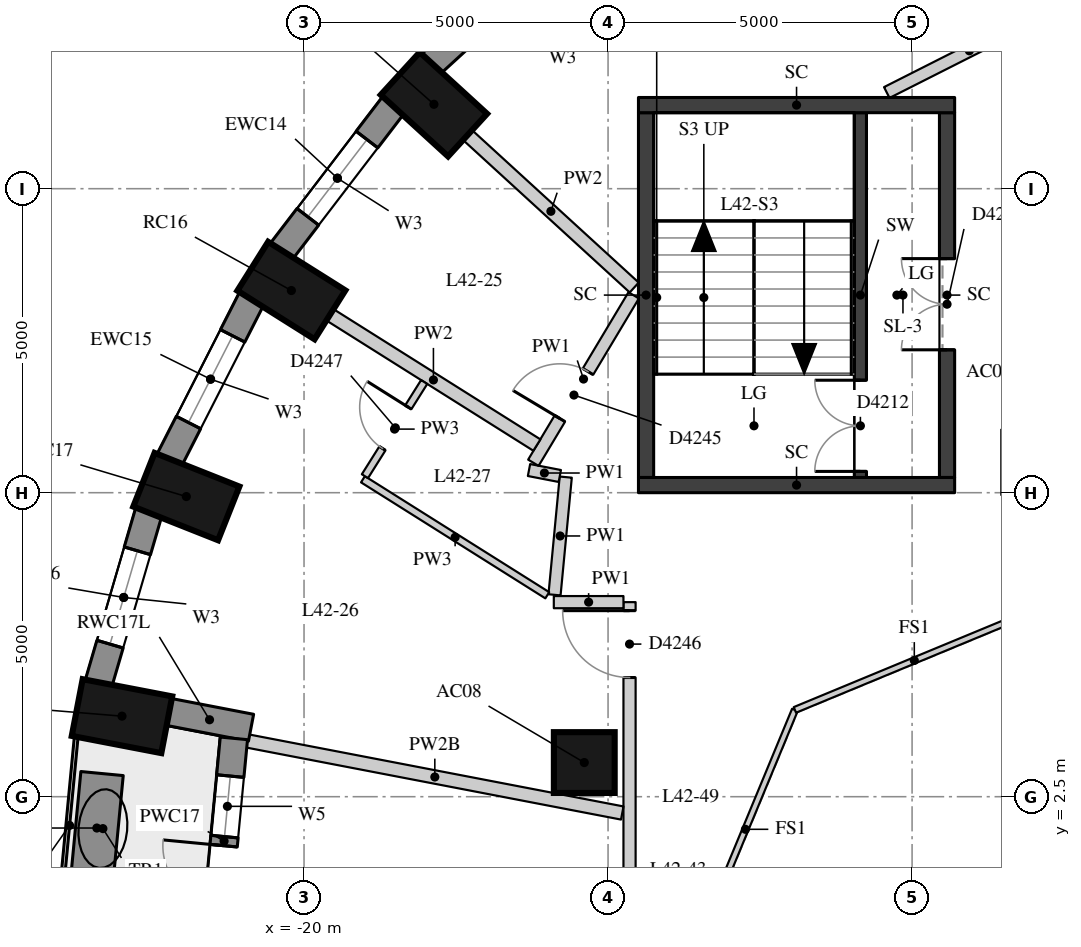
"""IFC4 building model, lengths in metres.
Left out: names, types, materials, properties, quantities, classifications, styles, units other than length and angle.
Written with IfcOpenShell. Run it as: python <this file> out.ifc"""

import sys

from ifc_helpers import new_model, si_unit, direction, frame, frame_2d, origin, origin_2d, place, context, subcontext, project, spatial, rectangle, extrude, element, fill, save


model = new_model("IFC4")
c1 = context("Model", 3, precision=1e-05, world=origin(), true_north=direction((0.0, 1.0)))
c2 = subcontext(c1, "Body", "Model", "MODEL_VIEW")
j1 = project(units=[si_unit("LENGTHUNIT", "METRE"), si_unit("PLANEANGLEUNIT", "RADIAN")], contexts=[c1])
p1 = place(None, origin())
s1 = spatial("IfcSite", under=j1, at=p1, CompositionType="ELEMENT")
p2 = place(p1, origin())
s2 = spatial("IfcBuilding", under=s1, at=p2, CompositionType="ELEMENT")
p3 = place(p2, frame((0.0, 0.0, 151.7)))
s3 = spatial("IfcBuildingStorey", under=s2, at=p3, CompositionType="ELEMENT", Elevation=151.7)
for number, where, z_axis, x_axis in (
    (1, (-17.864, 13.888, 0.0), (0.0, 0.0, 1.0), (-0.738, 0.675, 0.0)),
    (2, (-20.208, 10.825, 0.0), (0.0, 0.0, 1.0), (-0.846, 0.533, 0.0)),
    (3, (-21.936, 7.436, 0.0), (0.0, 0.0, 1.0), (-0.93, 0.369, 0.0)),
    (4, (-22.994, 3.825, 0.0), (0.0, 0.0, 1.0), (-0.982, 0.189, 0.0)),
):
    element("IfcColumn", number, at=place(p3, frame(where, z_axis=z_axis, x_axis=x_axis)), inside=s3, PredefinedType="COLUMN", context=c2, shape_type="SweptSolid", body=[
        extrude(rectangle(XDim=1.5, YDim=0.95, at=origin_2d()), origin(), (0.0, 0.0, 1.0), 3.3),
    ])
p4 = place(p3, frame((-15.391, 3.062, 0.0), z_axis=(0.0, 0.0, 1.0), x_axis=(1.0, 0.0, 0.0)))
e5 = element("IfcColumn", 5, at=p4, inside=s3, PredefinedType="COLUMN", context=c2, shape_type="SweptSolid", body=[
    extrude(rectangle(XDim=1.0, YDim=1.0, at=origin_2d()), origin(), (0.0, 0.0, 1.0), 3.3),
])
p5 = place(p3, frame((-15.63, 16.639, 0.0), z_axis=(0.0, 0.0, 1.0), x_axis=(-0.737808755941, -0.675009807082, 0.0)))
e6 = element("IfcWall", 6, at=p5, inside=s3, PredefinedType="SOLIDWALL", context=c2, shape_type="SweptSolid", body=[
    extrude(rectangle(XDim=3.094, YDim=0.45, at=frame_2d((1.547, 0.0))), origin(), (0.0, 0.0, 1.0), 3.02),
])
p6 = place(p5, frame((0.747, 0.0, 0.4)))
e7 = element("IfcOpeningElement", 7, at=p6, cuts=e6, PredefinedType="OPENING", context=c2, shape_type="SweptSolid", body=[
    extrude(rectangle(XDim=1.6, YDim=1.75, at=frame_2d((0.8, 0.875))), frame((0.0, 0.235, 0.0), z_axis=(0.0, -1.0, 0.0), x_axis=(1.0, 0.0, 0.0)), (0.0, 0.0, 1.0), 0.47),
])
p7 = place(p3, frame((-18.528, 13.879, 0.0), z_axis=(0.0, 0.0, 1.0), x_axis=(-0.607817056371, -0.794077090706, 0.0)))
e8 = element("IfcWall", 8, at=p7, inside=s3, PredefinedType="SOLIDWALL", context=c2, shape_type="SweptSolid", body=[
    extrude(rectangle(XDim=3.037, YDim=0.45, at=frame_2d((1.519, 0.0))), origin(), (0.0, 0.0, 1.0), 3.02),
])
p8 = place(p7, frame((0.719, 0.0, 0.4)))
e9 = element("IfcOpeningElement", 9, at=p8, cuts=e8, PredefinedType="OPENING", context=c2, shape_type="SweptSolid", body=[
    extrude(rectangle(XDim=1.6, YDim=1.75, at=frame_2d((0.8, 0.875))), frame((0.0, 0.235, 0.0), z_axis=(0.0, -1.0, 0.0), x_axis=(1.0, 0.0, 0.0)), (0.0, 0.0, 1.0), 0.47),
])
p9 = place(p3, frame((-20.859, 10.697, 0.0), z_axis=(0.0, 0.0, 1.0), x_axis=(-0.454133999889, -0.890933392653, 0.0)))
e10 = element("IfcWall", 10, at=p9, inside=s3, PredefinedType="SOLIDWALL", context=c2, shape_type="SweptSolid", body=[
    extrude(rectangle(XDim=2.986, YDim=0.45, at=frame_2d((1.493, 0.0))), origin(), (0.0, 0.0, 1.0), 3.02),
])
p10 = place(p9, frame((0.693, 0.0, 0.4)))
e11 = element("IfcOpeningElement", 11, at=p10, cuts=e10, PredefinedType="OPENING", context=c2, shape_type="SweptSolid", body=[
    extrude(rectangle(XDim=1.6, YDim=1.75, at=frame_2d((0.8, 0.875))), frame((0.0, 0.235, 0.0), z_axis=(0.0, -1.0, 0.0), x_axis=(1.0, 0.0, 0.0)), (0.0, 0.0, 1.0), 0.47),
])
p11 = place(p3, frame((-22.551, 7.191, 0.0), z_axis=(0.0, 0.0, 1.0), x_axis=(-0.281125768296, -0.959670934435, 0.0)))
e12 = element("IfcWall", 12, at=p11, inside=s3, PredefinedType="SOLIDWALL", context=c2, shape_type="SweptSolid", body=[
    extrude(rectangle(XDim=2.948, YDim=0.45, at=frame_2d((1.474, 0.0))), origin(), (0.0, 0.0, 1.0), 3.02),
])
p12 = place(p11, frame((0.674, 0.0, 0.4)))
e13 = element("IfcOpeningElement", 13, at=p12, cuts=e12, PredefinedType="OPENING", context=c2, shape_type="SweptSolid", body=[
    extrude(rectangle(XDim=1.6, YDim=1.75, at=frame_2d((0.8, 0.875))), frame((0.0, 0.235, 0.0), z_axis=(0.0, -1.0, 0.0), x_axis=(1.0, 0.0, 0.0)), (0.0, 0.0, 1.0), 0.47),
])
p13 = place(p3, frame((-22.237, 3.896, 0.0), z_axis=(0.0, 0.0, 1.0), x_axis=(0.98204526411, -0.188645432598, 0.0)))
e14 = element("IfcWall", 14, at=p13, inside=s3, PredefinedType="SOLIDWALL", context=c2, shape_type="SweptSolid", body=[
    extrude(rectangle(XDim=1.39, YDim=0.45, at=frame_2d((0.695, 0.0))), origin(), (0.0, 0.0, 1.0), 2.57),
])
p14 = place(p3, frame((-21.154, 3.459, 0.0), z_axis=(0.0, 0.0, 1.0), x_axis=(-0.094968544931, -0.995480273774, 0.0)))
e15 = element("IfcWall", 15, at=p14, inside=s3, PredefinedType="SOLIDWALL", context=c2, shape_type="SweptSolid", body=[
    extrude(rectangle(XDim=3.396, YDim=0.45, at=frame_2d((1.698, 0.0))), origin(), (0.0, 0.0, 1.0), 3.02),
])
p15 = place(p14, frame((0.623, 0.0, 0.4)))
e16 = element("IfcOpeningElement", 16, at=p15, cuts=e15, PredefinedType="OPENING", context=c2, shape_type="SweptSolid", body=[
    extrude(rectangle(XDim=1.0, YDim=1.75, at=frame_2d((0.5, 0.875))), frame((0.0, 0.235, 0.0), z_axis=(0.0, -1.0, 0.0), x_axis=(1.0, 0.0, 0.0)), (0.0, 0.0, 1.0), 0.47),
])
p16 = place(p14, frame((1.773, 0.0, 0.0)))
e17 = element("IfcOpeningElement", 17, at=p16, cuts=e15, PredefinedType="OPENING", context=c2, shape_type="SweptSolid", body=[
    extrude(rectangle(XDim=1.0, YDim=2.15, at=frame_2d((0.5, 1.075))), frame((0.0, 0.235, 0.0), z_axis=(0.0, -1.0, 0.0), x_axis=(1.0, 0.0, 0.0)), (0.0, 0.0, 1.0), 0.47),
])
p17 = place(p3, frame((-23.322, 2.881, 0.0), z_axis=(0.0, 0.0, 1.0), x_axis=(-0.095205890594, -0.995457602511, 0.0)))
e18 = element("IfcWall", 18, at=p17, inside=s3, PredefinedType="USERDEFINED", context=c2, shape_type="SweptSolid", body=[
    extrude(rectangle(XDim=1.8, YDim=0.7, at=frame_2d((0.9, 0.0))), origin(), (0.0, 0.0, 1.0), 0.75),
])
p18 = place(p3, frame((-10.85, 7.75, 0.0), z_axis=(0.0, 0.0, 1.0), x_axis=(0.0, 1.0, 0.0)))
e19 = element("IfcWall", 19, at=p18, inside=s3, PredefinedType="SHEAR", context=c2, shape_type="SweptSolid", body=[
    extrude(rectangle(XDim=6.0, YDim=0.2, at=frame_2d((3.0, 0.0))), origin(), (0.0, 0.0, 1.0), 3.02),
])
p19 = place(p18, frame((0.1, 0.0, 0.0)))
e20 = element("IfcOpeningElement", 20, at=p19, cuts=e19, PredefinedType="OPENING", context=c2, shape_type="SweptSolid", body=[
    extrude(rectangle(XDim=1.5, YDim=2.1, at=frame_2d((0.75, 1.05))), frame((0.0, 0.11, 0.0), z_axis=(0.0, -1.0, 0.0), x_axis=(1.0, 0.0, 0.0)), (0.0, 0.0, 1.0), 0.22),
])
p20 = place(p3, frame((-14.375, 7.75, -0.28), z_axis=(0.0, 0.0, 1.0), x_axis=(0.0, 1.0, 0.0)))
e21 = element("IfcWall", 21, at=p20, inside=s3, PredefinedType="SHEAR", context=c2, shape_type="SweptSolid", body=[
    extrude(rectangle(XDim=6.0, YDim=0.25, at=frame_2d((3.0, 0.0))), origin(), (0.0, 0.0, 1.0), 3.3),
])
p21 = place(p3, frame((-9.425, 7.75, -0.28), z_axis=(0.0, 0.0, 1.0), x_axis=(0.0, 1.0, 0.0)))
e22 = element("IfcWall", 22, at=p21, inside=s3, PredefinedType="SHEAR", context=c2, shape_type="SweptSolid", body=[
    extrude(rectangle(XDim=6.0, YDim=0.25, at=frame_2d((3.0, 0.0))), origin(), (0.0, 0.0, 1.0), 3.3),
])
p22 = place(p21, frame((2.1, 0.0, 0.28)))
e23 = element("IfcOpeningElement", 23, at=p22, cuts=e22, PredefinedType="OPENING", context=c2, shape_type="SweptSolid", body=[
    extrude(rectangle(XDim=1.5, YDim=2.1, at=frame_2d((0.75, 1.05))), frame((0.0, 0.135, 0.0), z_axis=(0.0, -1.0, 0.0), x_axis=(1.0, 0.0, 0.0)), (0.0, 0.0, 1.0), 0.27),
])
for number, where, z_axis, x_axis in (
    (24, (-14.5, 13.875, -0.28), (0.0, 0.0, 1.0), (1.0, 0.0, 0.0)),
    (25, (-14.5, 7.625, -0.28), (0.0, 0.0, 1.0), (1.0, 0.0, 0.0)),
):
    element("IfcWall", number, at=place(p3, frame(where, z_axis=z_axis, x_axis=x_axis)), inside=s3, PredefinedType="SHEAR", context=c2, shape_type="SweptSolid", body=[
        extrude(rectangle(XDim=5.2, YDim=0.25, at=frame_2d((2.6, 0.0))), origin(), (0.0, 0.0, 1.0), 3.3),
    ])
p23 = place(p3, frame((-14.647, -5.6, 0.0), z_axis=(0.0, 0.0, 1.0), x_axis=(0.0, 1.0, 0.0)))
e26 = element("IfcWall", 26, at=p23, inside=s3, PredefinedType="PARTITIONING", context=c2, shape_type="SweptSolid", body=[
    extrude(rectangle(XDim=11.3, YDim=0.2, at=frame_2d((5.65, 0.0))), origin(), (0.0, 0.0, 1.0), 3.02),
])
p24 = place(p23, frame((10.06, 0.0, 0.0)))
e27 = element("IfcOpeningElement", 27, at=p24, cuts=e26, PredefinedType="OPENING", context=c2, shape_type="SweptSolid", body=[
    extrude(rectangle(XDim=1.1, YDim=2.1, at=frame_2d((0.55, 1.05))), frame((0.0, 0.11, 0.0), z_axis=(0.0, -1.0, 0.0), x_axis=(1.0, 0.0, 0.0)), (0.0, 0.0, 1.0), 0.22),
])
p25 = place(p23, frame((3.639, 0.0, 0.0)))
e28 = element("IfcOpeningElement", 28, at=p25, cuts=e26, PredefinedType="OPENING", context=c2, shape_type="SweptSolid", body=[
    extrude(rectangle(XDim=1.2, YDim=2.1, at=frame_2d((0.6, 1.05))), frame((0.0, 0.11, 0.0), z_axis=(0.0, -1.0, 0.0), x_axis=(1.0, 0.0, 0.0)), (0.0, 0.0, 1.0), 0.22),
])
p26 = place(p23, frame((0.14, 0.0, 0.0)))
e29 = element("IfcOpeningElement", 29, at=p26, cuts=e26, PredefinedType="OPENING", context=c2, shape_type="SweptSolid", body=[
    extrude(rectangle(XDim=0.9, YDim=2.1, at=frame_2d((0.45, 1.05))), frame((0.0, 0.11, 0.0), z_axis=(0.0, -1.0, 0.0), x_axis=(1.0, 0.0, 0.0)), (0.0, 0.0, 1.0), 0.22),
])
p27 = place(p3, frame((-14.747, 5.7, 0.0), z_axis=(0.0, 0.0, 1.0), x_axis=(-1.0, 0.0, 0.0)))
e30 = element("IfcWall", 30, at=p27, inside=s3, PredefinedType="PARTITIONING", context=c2, shape_type="SweptSolid", body=[
    extrude(rectangle(XDim=1.145, YDim=0.2, at=frame_2d((0.573, 0.0))), origin(), (0.0, 0.0, 1.0), 3.02),
])
p28 = place(p3, frame((-15.88, 5.82, 0.0), z_axis=(0.0, 0.0, 1.0), x_axis=(0.094892019157, 0.995487571344, 0.0)))
e31 = element("IfcWall", 31, at=p28, inside=s3, PredefinedType="PARTITIONING", context=c2, shape_type="SweptSolid", body=[
    extrude(rectangle(XDim=1.945, YDim=0.2, at=frame_2d((0.973, 0.0))), origin(), (0.0, 0.0, 1.0), 3.02),
])
p29 = place(p3, frame((-15.793, 7.775, 0.0), z_axis=(0.0, 0.0, 1.0), x_axis=(-0.981833914825, 0.189742361371, 0.0)))
e32 = element("IfcWall", 32, at=p29, inside=s3, PredefinedType="PARTITIONING", context=c2, shape_type="SweptSolid", body=[
    extrude(rectangle(XDim=0.516, YDim=0.2, at=frame_2d((0.258, 0.0))), origin(), (0.0, 0.0, 1.0), 3.02),
])
p30 = place(p3, frame((-16.228, 7.992, 0.0), z_axis=(0.0, 0.0, 1.0), x_axis=(0.513936465122, 0.857828251935, 0.0)))
e33 = element("IfcWall", 33, at=p30, inside=s3, PredefinedType="PARTITIONING", context=c2, shape_type="SweptSolid", body=[
    extrude(rectangle(XDim=3.21, YDim=0.2, at=frame_2d((1.605, 0.0))), origin(), (0.0, 0.0, 1.0), 3.02),
])
p31 = place(p30, frame((0.848, 0.0, 0.0)))
e34 = element("IfcOpeningElement", 34, at=p31, cuts=e33, PredefinedType="OPENING", context=c2, shape_type="SweptSolid", body=[
    extrude(rectangle(XDim=0.9, YDim=2.1, at=frame_2d((0.45, 1.05))), frame((0.0, 0.11, 0.0), z_axis=(0.0, -1.0, 0.0), x_axis=(1.0, 0.0, 0.0)), (0.0, 0.0, 1.0), 0.22),
])
p32 = place(p3, frame((-10.416, 14.082, 0.0), z_axis=(0.0, 0.0, 1.0), x_axis=(0.892396808139, 0.451251522793, 0.0)))
e35 = element("IfcWall", 35, at=p32, inside=s3, PredefinedType="PARTITIONING", context=c2, shape_type="SweptSolid", body=[
    extrude(rectangle(XDim=3.044, YDim=0.2, at=frame_2d((1.522, 0.0))), origin(), (0.0, 0.0, 1.0), 3.02),
])
p33 = place(p3, frame((-17.31, 13.382, 0.0), z_axis=(0.0, 0.0, 1.0), x_axis=(0.737860436015, -0.674953314655, 0.0)))
e36 = element("IfcWall", 36, at=p33, inside=s3, PredefinedType="PARTITIONING", context=c2, shape_type="SweptSolid", body=[
    extrude(rectangle(XDim=3.714, YDim=0.22, at=frame_2d((1.857, 0.0))), origin(), (0.0, 0.0, 1.0), 3.02),
])
p34 = place(p3, frame((-19.573, 10.426, 0.0), z_axis=(0.0, 0.0, 1.0), x_axis=(0.846298736827, -0.532708595805, 0.0)))
e37 = element("IfcWall", 37, at=p34, inside=s3, PredefinedType="PARTITIONING", context=c2, shape_type="SweptSolid", body=[
    extrude(rectangle(XDim=4.021, YDim=0.22, at=frame_2d((2.011, 0.0))), origin(), (0.0, 0.0, 1.0), 3.02),
])
p35 = place(p3, frame((-20.932, 3.417, 0.0), z_axis=(0.0, 0.0, 1.0), x_axis=(0.982023362662, -0.188759410856, 0.0)))
e38 = element("IfcWall", 38, at=p35, inside=s3, PredefinedType="PARTITIONING", context=c2, shape_type="SweptSolid", body=[
    extrude(rectangle(XDim=6.278, YDim=0.22, at=frame_2d((3.139, 0.0))), origin(), (0.0, 0.0, 1.0), 2.57),
])
p36 = place(p3, frame((-16.0, 5.813, 0.0), z_axis=(0.0, 0.0, 1.0), x_axis=(-0.846339825068, 0.53264331452, 0.0)))
e39 = element("IfcWall", 39, at=p36, inside=s3, PredefinedType="PARTITIONING", context=c2, shape_type="SweptSolid", body=[
    extrude(rectangle(XDim=3.582, YDim=0.12, at=frame_2d((1.791, 0.0))), origin(), (0.0, 0.0, 1.0), 3.02),
])
p37 = place(p3, frame((-18.999, 7.771, 0.0), z_axis=(0.0, 0.0, 1.0), x_axis=(0.532431076319, 0.84647335987, 0.0)))
e40 = element("IfcWall", 40, at=p37, inside=s3, PredefinedType="PARTITIONING", context=c2, shape_type="SweptSolid", body=[
    extrude(rectangle(XDim=1.83, YDim=0.12, at=frame_2d((0.915, 0.0))), origin(), (0.0, 0.0, 1.0), 3.02),
])
p38 = place(p37, frame((0.54, 0.0, 0.0)))
e41 = element("IfcOpeningElement", 41, at=p38, cuts=e40, PredefinedType="OPENING", context=c2, shape_type="SweptSolid", body=[
    extrude(rectangle(XDim=0.8, YDim=2.1, at=frame_2d((0.4, 1.05))), frame((0.0, 0.07, 0.0), z_axis=(0.0, -1.0, 0.0), x_axis=(1.0, 0.0, 0.0)), (0.0, 0.0, 1.0), 0.14),
])
for number, where, z_axis, x_axis in (
    (42, (-13.554, 0.0, 0.0), (0.0, 0.0, 1.0), (0.383, 0.924, 0.0)),
    (43, (-11.927, 3.927, 0.0), (0.0, 0.0, 1.0), (0.924, 0.383, 0.0)),
):
    element("IfcWall", number, at=place(p3, frame(where, z_axis=z_axis, x_axis=x_axis)), inside=s3, PredefinedType="PARTITIONING", context=c2, shape_type="SweptSolid", body=[
        extrude(rectangle(XDim=4.251, YDim=0.1, at=frame_2d((2.125, 0.0))), origin(), (0.0, 0.0, 1.0), 3.02),
    ])
p39 = place(p8, origin())
e44 = element("IfcWindow", 44, at=p39, inside=s3, PartitioningType="SINGLE_PANEL", PredefinedType="WINDOW", context=c2, shape_type="SweptSolid", body=[
    extrude(rectangle(XDim=1.6, YDim=1.75, at=frame_2d((0.8, 0.875))), frame((0.0, 0.035, 0.0), z_axis=(0.0, -1.0, 0.0), x_axis=(1.0, 0.0, 0.0)), (0.0, 0.0, 1.0), 0.06),
])
fill(e9, e44)
p40 = place(p10, origin())
e45 = element("IfcWindow", 45, at=p40, inside=s3, PartitioningType="SINGLE_PANEL", PredefinedType="WINDOW", context=c2, shape_type="SweptSolid", body=[
    extrude(rectangle(XDim=1.6, YDim=1.75, at=frame_2d((0.8, 0.875))), frame((0.0, 0.035, 0.0), z_axis=(0.0, -1.0, 0.0), x_axis=(1.0, 0.0, 0.0)), (0.0, 0.0, 1.0), 0.06),
])
fill(e11, e45)
p41 = place(p12, origin())
e46 = element("IfcWindow", 46, at=p41, inside=s3, PartitioningType="SINGLE_PANEL", PredefinedType="WINDOW", context=c2, shape_type="SweptSolid", body=[
    extrude(rectangle(XDim=1.6, YDim=1.75, at=frame_2d((0.8, 0.875))), frame((0.0, 0.035, 0.0), z_axis=(0.0, -1.0, 0.0), x_axis=(1.0, 0.0, 0.0)), (0.0, 0.0, 1.0), 0.06),
])
fill(e13, e46)
p42 = place(p15, origin())
e47 = element("IfcWindow", 47, at=p42, inside=s3, PartitioningType="SINGLE_PANEL", PredefinedType="WINDOW", context=c2, shape_type="SweptSolid", body=[
    extrude(rectangle(XDim=1.0, YDim=1.75, at=frame_2d((0.5, 0.875))), frame((0.0, 0.035, 0.0), z_axis=(0.0, -1.0, 0.0), x_axis=(1.0, 0.0, 0.0)), (0.0, 0.0, 1.0), 0.06),
])
fill(e16, e47)
p43 = place(p16, frame((1.0, 0.0, 0.0), z_axis=(0.0, 0.0, 1.0), x_axis=(-1.0, 0.0, 0.0)))
e48 = element("IfcDoor", 48, at=p43, inside=s3, OperationType="SINGLE_SWING_RIGHT", PredefinedType="DOOR", context=c2, shape_type="SweptSolid", body=[
    extrude(rectangle(XDim=1.0, YDim=2.15, at=frame_2d((0.5, 1.075))), frame((0.0, 0.075, 0.0), z_axis=(0.0, -1.0, 0.0), x_axis=(1.0, 0.0, 0.0)), (0.0, 0.0, 1.0), 0.05),
])
fill(e17, e48)
p44 = place(p19, origin())
e49 = element("IfcDoor", 49, at=p44, inside=s3, OperationType="DOUBLE_DOOR_SINGLE_SWING", PredefinedType="DOOR", context=c2, shape_type="SweptSolid", body=[
    extrude(rectangle(XDim=1.5, YDim=2.1, at=frame_2d((0.75, 1.05))), frame((0.0, 0.025, 0.0), z_axis=(0.0, -1.0, 0.0), x_axis=(1.0, 0.0, 0.0)), (0.0, 0.0, 1.0), 0.05),
])
fill(e20, e49)
p45 = place(p22, origin())
e50 = element("IfcDoor", 50, at=p45, inside=s3, OperationType="DOUBLE_DOOR_SINGLE_SWING", PredefinedType="DOOR", context=c2, shape_type="SweptSolid", body=[
    extrude(rectangle(XDim=1.5, YDim=2.1, at=frame_2d((0.75, 1.05))), frame((0.0, 0.025, 0.0), z_axis=(0.0, -1.0, 0.0), x_axis=(1.0, 0.0, 0.0)), (0.0, 0.0, 1.0), 0.05),
])
fill(e23, e50)
p46 = place(p31, origin())
e51 = element("IfcDoor", 51, at=p46, inside=s3, OperationType="SINGLE_SWING_LEFT", PredefinedType="DOOR", context=c2, shape_type="SweptSolid", body=[
    extrude(rectangle(XDim=0.9, YDim=2.1, at=frame_2d((0.45, 1.05))), frame((0.0, 0.025, 0.0), z_axis=(0.0, -1.0, 0.0), x_axis=(1.0, 0.0, 0.0)), (0.0, 0.0, 1.0), 0.05),
])
fill(e34, e51)
p47 = place(p24, origin())
e52 = element("IfcDoor", 52, at=p47, inside=s3, OperationType="SINGLE_SWING_RIGHT", PredefinedType="DOOR", context=c2, shape_type="SweptSolid", body=[
    extrude(rectangle(XDim=1.1, YDim=2.1, at=frame_2d((0.55, 1.05))), frame((0.0, 0.025, 0.0), z_axis=(0.0, -1.0, 0.0), x_axis=(1.0, 0.0, 0.0)), (0.0, 0.0, 1.0), 0.05),
])
fill(e27, e52)
p48 = place(p38, origin())
e53 = element("IfcDoor", 53, at=p48, inside=s3, OperationType="SINGLE_SWING_RIGHT", PredefinedType="DOOR", context=c2, shape_type="SweptSolid", body=[
    extrude(rectangle(XDim=0.8, YDim=2.1, at=frame_2d((0.4, 1.05))), frame((0.0, 0.025, 0.0), z_axis=(0.0, -1.0, 0.0), x_axis=(1.0, 0.0, 0.0)), (0.0, 0.0, 1.0), 0.05),
])
fill(e41, e53)
save(model, sys.argv[1])
